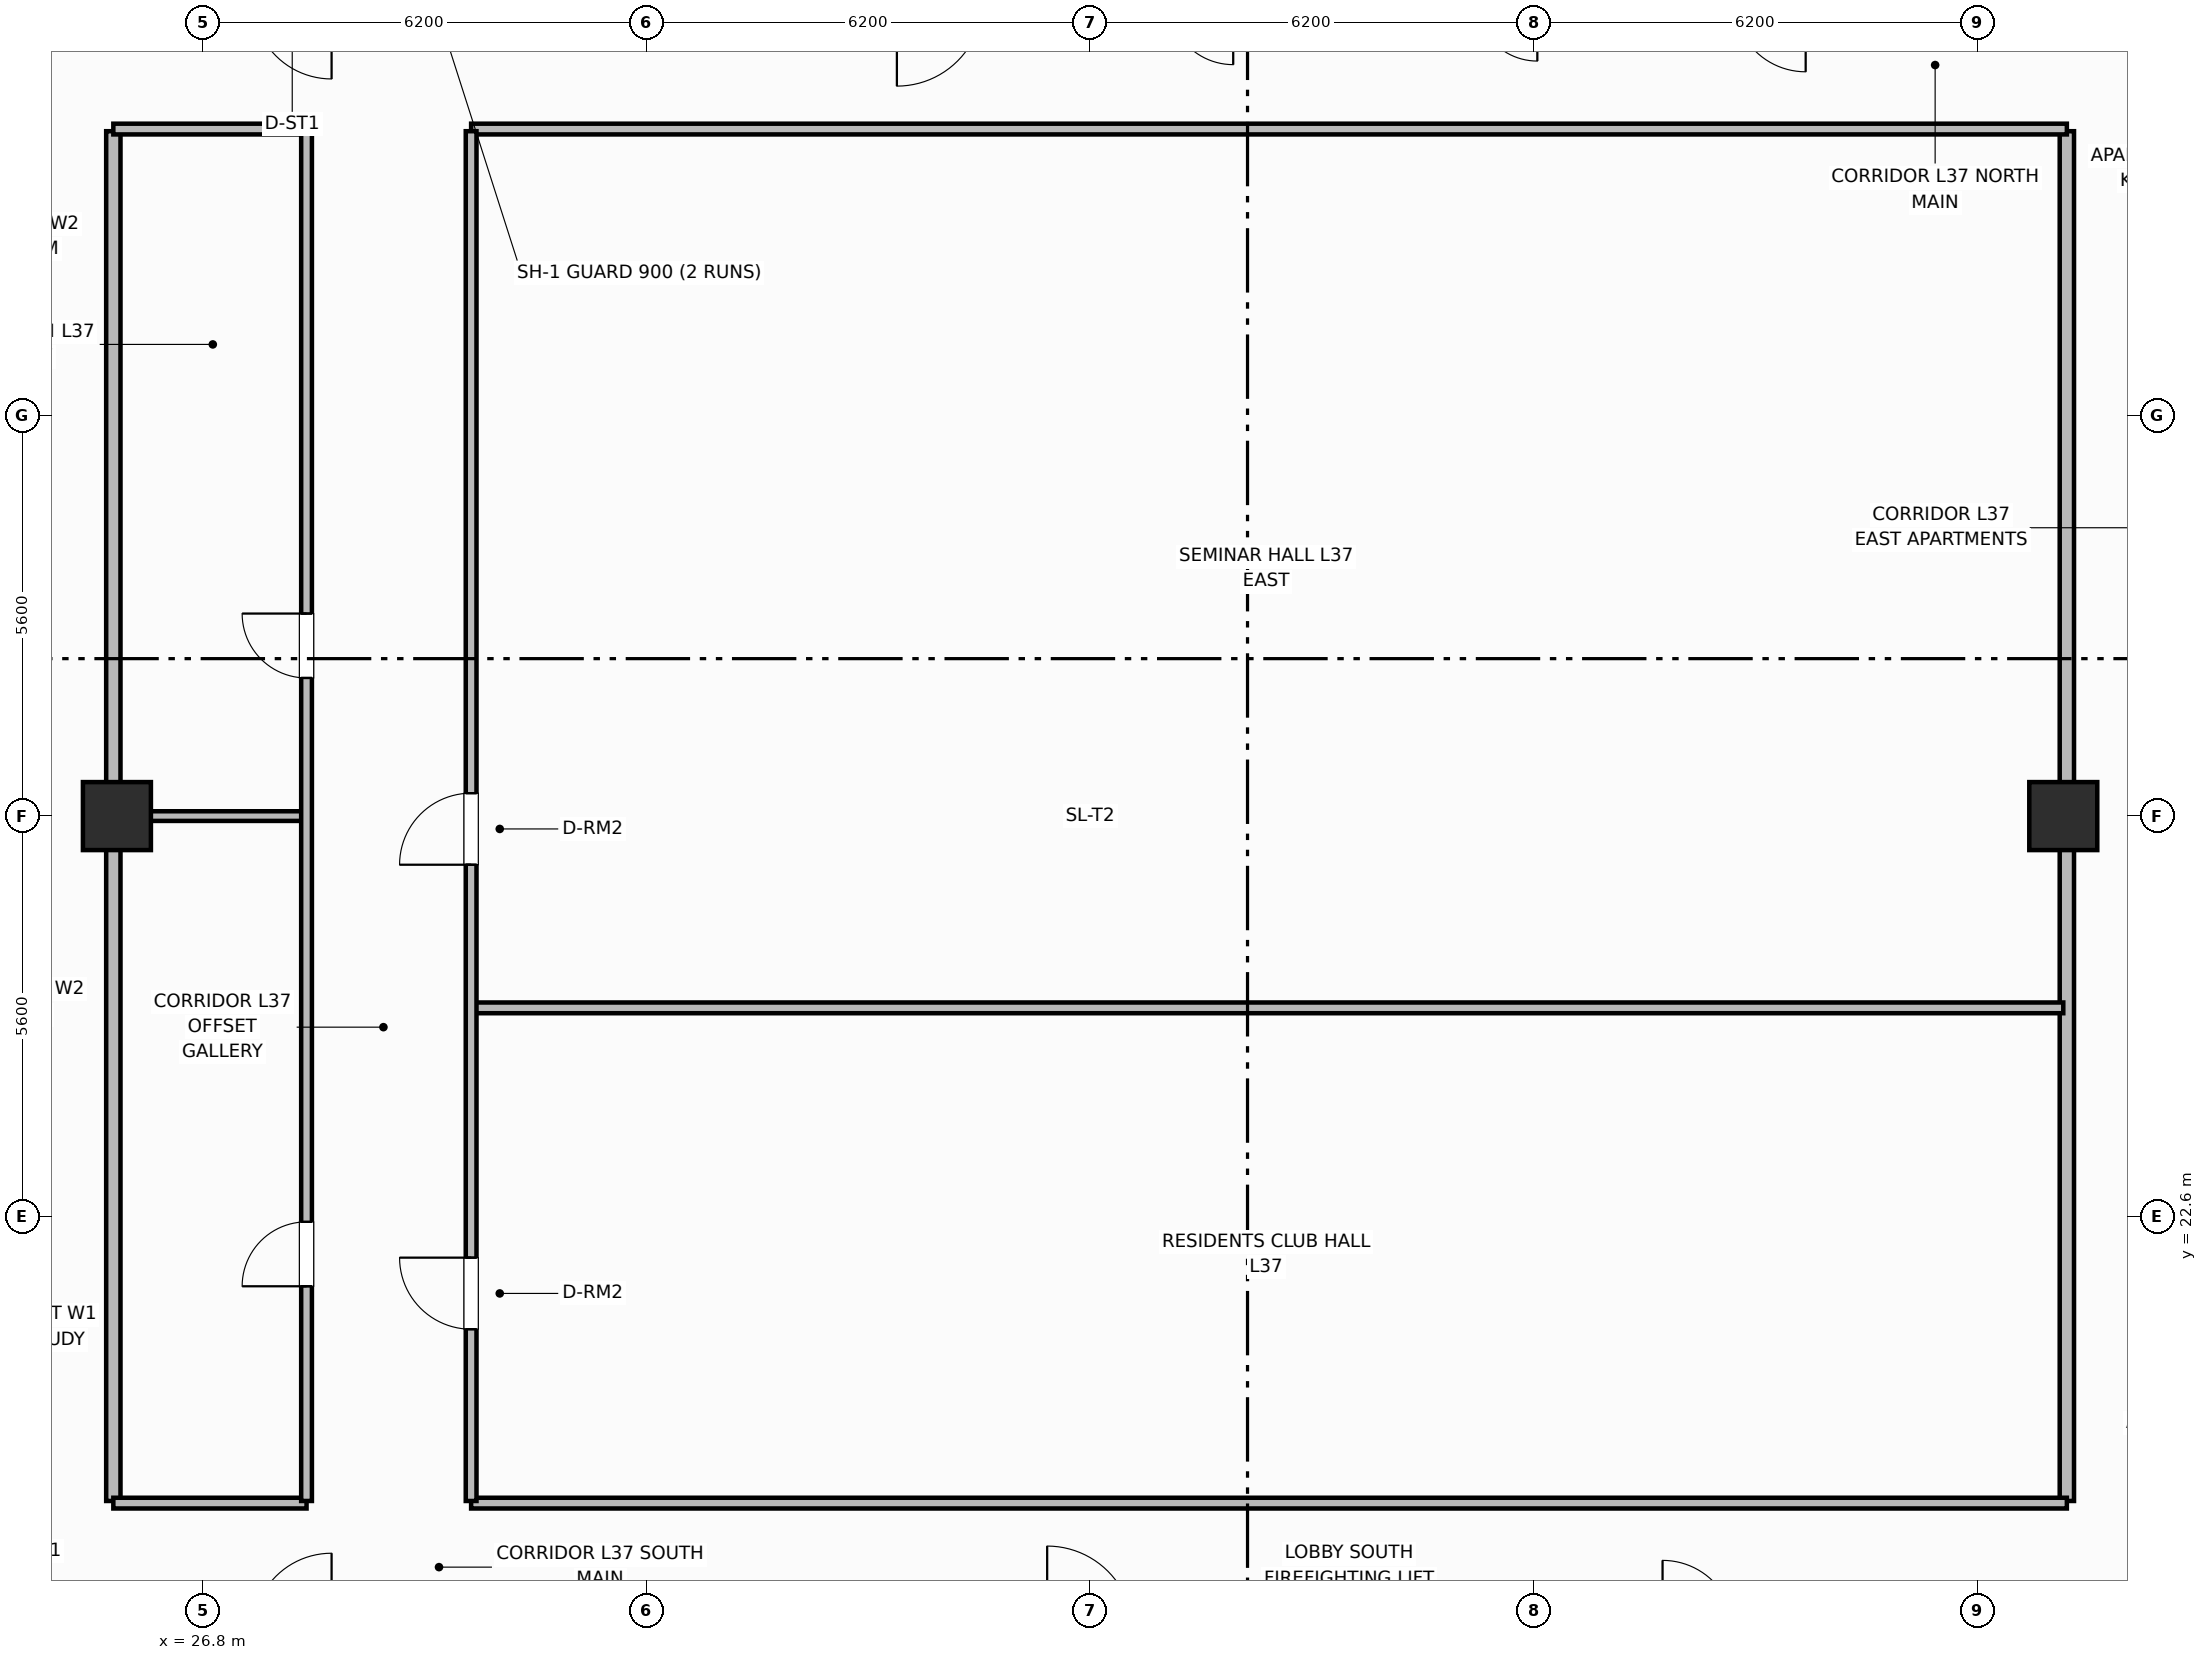
"""IFC4 building model, lengths in metres.
Left out: names, types, materials, properties, quantities, classifications, styles, units other than length and angle.
Written with IfcOpenShell. Run it as: python <this file> out.ifc"""

import sys

from ifc_helpers import new_model, si_unit, direction, frame, frame_2d, origin, origin_2d, place, context, subcontext, project, spatial, rectangle, extrude, element, fill, save


model = new_model("IFC4")
c1 = context("Model", 3, precision=1e-05, world=origin(), true_north=direction((0.0, 1.0)))
c2 = subcontext(c1, "Body", "Model", "MODEL_VIEW")
j1 = project(units=[si_unit("LENGTHUNIT", "METRE"), si_unit("PLANEANGLEUNIT", "RADIAN")], contexts=[c1])
p1 = place(None, origin())
s1 = spatial("IfcSite", under=j1, at=p1, CompositionType="ELEMENT")
p2 = place(p1, origin())
s2 = spatial("IfcBuilding", under=s1, at=p2, CompositionType="ELEMENT")
p3 = place(p2, frame((0.0, 0.0, 151.5)))
s3 = spatial("IfcBuildingStorey", under=s2, at=p3, CompositionType="ELEMENT", Elevation=151.5)
for number, where, z_axis, x_axis in (
    (1, (25.6, 28.2, 0.0), (0.0, 0.0, 1.0), (1.0, 0.0, 0.0)),
    (2, (52.8, 28.2, 0.0), (0.0, 0.0, 1.0), (1.0, 0.0, 0.0)),
):
    element("IfcColumn", number, at=place(p3, frame(where, z_axis=z_axis, x_axis=x_axis)), inside=s3, PredefinedType="COLUMN", context=c2, shape_type="SweptSolid", body=[
        extrude(rectangle(XDim=0.95, YDim=0.95, at=origin_2d()), origin(), (0.0, 0.0, 1.0), 3.7),
    ])
for number, where, z_axis, x_axis in (
    (3, (25.55, 18.63, 0.0), (0.0, 0.0, 1.0), (0.0, 1.0, 0.0)),
    (4, (52.85, 18.63, 0.0), (0.0, 0.0, 1.0), (0.0, 1.0, 0.0)),
):
    element("IfcWall", number, at=place(p3, frame(where, z_axis=z_axis, x_axis=x_axis)), inside=s3, PredefinedType="PARTITIONING", context=c2, shape_type="SweptSolid", body=[
        extrude(rectangle(XDim=19.14, YDim=0.2, at=frame_2d((9.57, 0.0))), origin(), (0.0, 0.0, 1.0), 2.55),
    ])
p4 = place(p3, frame((25.55, 18.6, 0.0), z_axis=(0.0, 0.0, 1.0), x_axis=(1.0, 0.0, 0.0)))
e5 = element("IfcWall", 5, at=p4, inside=s3, PredefinedType="PARTITIONING", context=c2, shape_type="SweptSolid", body=[
    extrude(rectangle(XDim=2.7, YDim=0.15, at=frame_2d((1.35, 0.0))), origin(), (0.0, 0.0, 1.0), 2.55),
])
p5 = place(p3, frame((30.55, 18.6, 0.0), z_axis=(0.0, 0.0, 1.0), x_axis=(1.0, 0.0, 0.0)))
e6 = element("IfcWall", 6, at=p5, inside=s3, PredefinedType="PARTITIONING", context=c2, shape_type="SweptSolid", body=[
    extrude(rectangle(XDim=22.3, YDim=0.15, at=frame_2d((11.15, 0.0))), origin(), (0.0, 0.0, 1.0), 2.55),
])
p6 = place(p3, frame((25.55, 37.8, 0.0), z_axis=(0.0, 0.0, 1.0), x_axis=(1.0, 0.0, 0.0)))
e7 = element("IfcWall", 7, at=p6, inside=s3, PredefinedType="PARTITIONING", context=c2, shape_type="SweptSolid", body=[
    extrude(rectangle(XDim=2.7, YDim=0.15, at=frame_2d((1.35, 0.0))), origin(), (0.0, 0.0, 1.0), 2.55),
])
p7 = place(p3, frame((30.55, 37.8, 0.0), z_axis=(0.0, 0.0, 1.0), x_axis=(1.0, 0.0, 0.0)))
e8 = element("IfcWall", 8, at=p7, inside=s3, PredefinedType="PARTITIONING", context=c2, shape_type="SweptSolid", body=[
    extrude(rectangle(XDim=22.3, YDim=0.15, at=frame_2d((11.15, 0.0))), origin(), (0.0, 0.0, 1.0), 2.55),
])
p8 = place(p3, frame((25.6, 28.2, 0.0), z_axis=(0.0, 0.0, 1.0), x_axis=(1.0, 0.0, 0.0)))
e9 = element("IfcWall", 9, at=p8, inside=s3, PredefinedType="PARTITIONING", context=c2, shape_type="SweptSolid", body=[
    extrude(rectangle(XDim=2.66, YDim=0.135, at=frame_2d((1.33, 0.0))), origin(), (0.0, 0.0, 1.0), 2.55),
])
p9 = place(p3, frame((30.58, 25.521, 0.0), z_axis=(0.0, 0.0, 1.0), x_axis=(1.0, 0.0, 0.0)))
e10 = element("IfcWall", 10, at=p9, inside=s3, PredefinedType="PARTITIONING", context=c2, shape_type="SweptSolid", body=[
    extrude(rectangle(XDim=22.22, YDim=0.15, at=frame_2d((11.11, 0.0))), origin(), (0.0, 0.0, 1.0), 2.55),
])
p10 = place(p3, frame((28.25, 18.63, 0.0), z_axis=(0.0, 0.0, 1.0), x_axis=(0.0, 1.0, 0.0)))
e11 = element("IfcWall", 11, at=p10, inside=s3, PredefinedType="PARTITIONING", context=c2, shape_type="SweptSolid", body=[
    extrude(rectangle(XDim=19.14, YDim=0.15, at=frame_2d((9.57, 0.0))), origin(), (0.0, 0.0, 1.0), 2.55),
])
p11 = place(p10, frame((3.0, 0.0, 0.0)))
e12 = element("IfcOpeningElement", 12, at=p11, cuts=e11, PredefinedType="OPENING", context=c2, shape_type="SweptSolid", body=[
    extrude(rectangle(XDim=0.9, YDim=2.1, at=frame_2d((0.45, 1.05))), frame((0.0, 0.085, 0.0), z_axis=(0.0, -1.0, 0.0), x_axis=(1.0, 0.0, 0.0)), (0.0, 0.0, 1.0), 0.17),
])
p12 = place(p10, frame((11.5, 0.0, 0.0)))
e13 = element("IfcOpeningElement", 13, at=p12, cuts=e11, PredefinedType="OPENING", context=c2, shape_type="SweptSolid", body=[
    extrude(rectangle(XDim=0.9, YDim=2.1, at=frame_2d((0.45, 1.05))), frame((0.0, 0.085, 0.0), z_axis=(0.0, -1.0, 0.0), x_axis=(1.0, 0.0, 0.0)), (0.0, 0.0, 1.0), 0.17),
])
p13 = place(p3, frame((30.55, 18.63, 0.0), z_axis=(0.0, 0.0, 1.0), x_axis=(0.0, 1.0, 0.0)))
e14 = element("IfcWall", 14, at=p13, inside=s3, PredefinedType="PARTITIONING", context=c2, shape_type="SweptSolid", body=[
    extrude(rectangle(XDim=19.14, YDim=0.15, at=frame_2d((9.57, 0.0))), origin(), (0.0, 0.0, 1.0), 2.55),
])
p14 = place(p13, frame((2.4, 0.0, 0.0)))
e15 = element("IfcOpeningElement", 15, at=p14, cuts=e14, PredefinedType="OPENING", context=c2, shape_type="SweptSolid", body=[
    extrude(rectangle(XDim=1.0, YDim=2.15, at=frame_2d((0.5, 1.075))), frame((0.0, 0.085, 0.0), z_axis=(0.0, -1.0, 0.0), x_axis=(1.0, 0.0, 0.0)), (0.0, 0.0, 1.0), 0.17),
])
p15 = place(p13, frame((8.89, 0.0, 0.0)))
e16 = element("IfcOpeningElement", 16, at=p15, cuts=e14, PredefinedType="OPENING", context=c2, shape_type="SweptSolid", body=[
    extrude(rectangle(XDim=1.0, YDim=2.15, at=frame_2d((0.5, 1.075))), frame((0.0, 0.085, 0.0), z_axis=(0.0, -1.0, 0.0), x_axis=(1.0, 0.0, 0.0)), (0.0, 0.0, 1.0), 0.17),
])
p16 = place(p11, origin())
e17 = element("IfcDoor", 17, at=p16, inside=s3, OperationType="SINGLE_SWING_LEFT", PredefinedType="DOOR", context=c2, shape_type="SweptSolid", body=[
    extrude(rectangle(XDim=0.9, YDim=2.1, at=frame_2d((0.45, 1.05))), frame((0.0, 0.025, 0.0), z_axis=(0.0, -1.0, 0.0), x_axis=(1.0, 0.0, 0.0)), (0.0, 0.0, 1.0), 0.05),
])
fill(e12, e17)
p17 = place(p12, origin())
e18 = element("IfcDoor", 18, at=p17, inside=s3, OperationType="SINGLE_SWING_RIGHT", PredefinedType="DOOR", context=c2, shape_type="SweptSolid", body=[
    extrude(rectangle(XDim=0.9, YDim=2.1, at=frame_2d((0.45, 1.05))), frame((0.0, 0.025, 0.0), z_axis=(0.0, -1.0, 0.0), x_axis=(1.0, 0.0, 0.0)), (0.0, 0.0, 1.0), 0.05),
])
fill(e13, e18)
p18 = place(p14, origin())
e19 = element("IfcDoor", 19, at=p18, inside=s3, OperationType="SINGLE_SWING_RIGHT", PredefinedType="DOOR", context=c2, shape_type="SweptSolid", body=[
    extrude(rectangle(XDim=1.0, YDim=2.15, at=frame_2d((0.5, 1.075))), frame((0.0, 0.025, 0.0), z_axis=(0.0, -1.0, 0.0), x_axis=(1.0, 0.0, 0.0)), (0.0, 0.0, 1.0), 0.05),
])
fill(e15, e19)
p19 = place(p15, origin())
e20 = element("IfcDoor", 20, at=p19, inside=s3, OperationType="SINGLE_SWING_LEFT", PredefinedType="DOOR", context=c2, shape_type="SweptSolid", body=[
    extrude(rectangle(XDim=1.0, YDim=2.15, at=frame_2d((0.5, 1.075))), frame((0.0, 0.025, 0.0), z_axis=(0.0, -1.0, 0.0), x_axis=(1.0, 0.0, 0.0)), (0.0, 0.0, 1.0), 0.05),
])
fill(e16, e20)
save(model, sys.argv[1])
